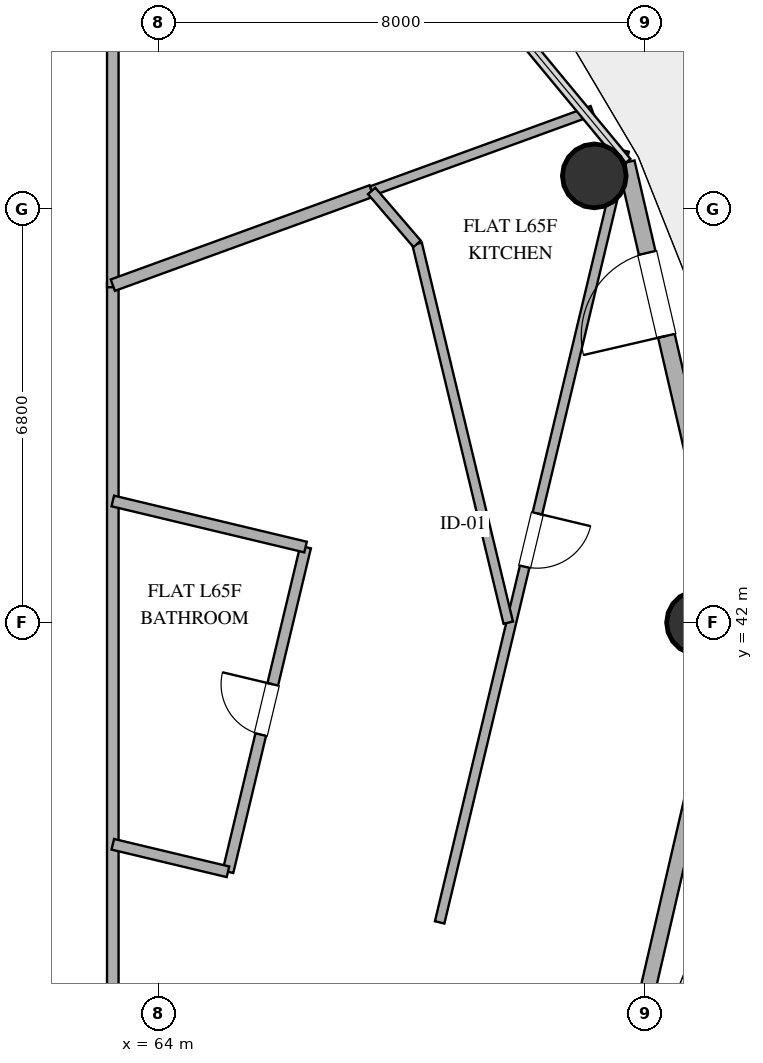
"""IFC4 building model, lengths in metres.
Left out: names, types, materials, properties, quantities, classifications, styles, units other than length and angle.
Written with IfcOpenShell. Run it as: python <this file> out.ifc"""

import sys

from ifc_helpers import new_model, si_unit, direction, frame, frame_2d, origin, origin_2d, place, context, subcontext, project, spatial, rectangle, hollow_circle, extrude, element, fill, save


model = new_model("IFC4")
c1 = context("Model", 3, precision=1e-05, world=origin(), true_north=direction((0.0, 1.0)))
c2 = subcontext(c1, "Body", "Model", "MODEL_VIEW")
j1 = project(units=[si_unit("LENGTHUNIT", "METRE"), si_unit("PLANEANGLEUNIT", "RADIAN")], contexts=[c1])
p1 = place(None, origin())
s1 = spatial("IfcSite", under=j1, at=p1, CompositionType="ELEMENT")
p2 = place(p1, origin())
s2 = spatial("IfcBuilding", under=s1, at=p2, CompositionType="ELEMENT")
p3 = place(p2, frame((0.0, 0.0, 253.2)))
s3 = spatial("IfcBuildingStorey", under=s2, at=p3, CompositionType="ELEMENT", Elevation=253.2)
for number, where, z_axis, x_axis in (
    (1, (72.883, 42.0, 0.0), (0.0, 0.0, 1.0), (1.0, 0.0, 0.0)),
    (2, (71.169, 49.347, 0.0), (0.0, 0.0, 1.0), (1.0, 0.0, 0.0)),
):
    element("IfcColumn", number, at=place(p3, frame(where, z_axis=z_axis, x_axis=x_axis)), inside=s3, PredefinedType="COLUMN", context=c2, shape_type="SweptSolid", body=[
        extrude(hollow_circle(Radius=0.525, WallThickness=0.028, at=origin_2d()), origin(), (0.0, 0.0, 1.0), 3.25),
    ])
p4 = place(p3, frame((73.447, 42.0, 0.0), z_axis=(0.0, 0.0, 1.0), x_axis=(-0.225635078214, 0.974211892495, 0.0)))
e3 = element("IfcWall", 3, at=p4, inside=s3, PredefinedType="SOLIDWALL", context=c2, shape_type="SweptSolid", body=[
    extrude(rectangle(XDim=7.77, YDim=0.28, at=frame_2d((3.885, 0.0))), origin(), (0.0, 0.0, 1.0), 3.25),
])
p5 = place(p4, frame((4.842, 0.0, 0.0)))
e4 = element("IfcOpeningElement", 4, at=p5, cuts=e3, PredefinedType="OPENING", context=c2, shape_type="SweptSolid", body=[
    extrude(rectangle(XDim=1.4, YDim=2.2, at=frame_2d((0.7, 1.1))), frame((0.0, 0.15, 0.0), z_axis=(0.0, -1.0, 0.0), x_axis=(1.0, 0.0, 0.0)), (0.0, 0.0, 1.0), 0.3),
])
p6 = place(p3, frame((71.694, 34.43, 0.0), z_axis=(0.0, 0.0, 1.0), x_axis=(0.225635078214, 0.974211892495, 0.0)))
e5 = element("IfcWall", 5, at=p6, inside=s3, PredefinedType="SOLIDWALL", context=c2, shape_type="SweptSolid", body=[
    extrude(rectangle(XDim=7.77, YDim=0.25, at=frame_2d((3.885, 0.0))), origin(), (0.0, 0.0, 1.0), 3.25),
])
p7 = place(p3, frame((71.658, 49.763, 0.0), z_axis=(0.0, 0.0, 1.0), x_axis=(-0.23242816807, -0.972613564931, 0.0)))
e6 = element("IfcWall", 6, at=p7, inside=s3, PredefinedType="PLUMBINGWALL", context=c2, shape_type="SweptSolid", body=[
    extrude(rectangle(XDim=13.049, YDim=0.16, at=frame_2d((6.524, 0.0))), origin(), (0.0, 0.0, 1.0), 2.61),
])
p8 = place(p7, frame((6.135, 0.0, 0.0)))
e7 = element("IfcOpeningElement", 7, at=p8, cuts=e6, PredefinedType="OPENING", context=c2, shape_type="SweptSolid", body=[
    extrude(rectangle(XDim=0.9, YDim=2.1, at=frame_2d((0.45, 1.05))), frame((0.0, 0.09, 0.0), z_axis=(0.0, -1.0, 0.0), x_axis=(1.0, 0.0, 0.0)), (0.0, 0.0, 1.0), 0.18),
])
p9 = place(p3, frame((63.25, 47.585, 0.0), z_axis=(0.0, 0.0, 1.0), x_axis=(0.0, -1.0, 0.0)))
e8 = element("IfcWall", 8, at=p9, inside=s3, PredefinedType="PARTITIONING", context=c2, shape_type="SweptSolid", body=[
    extrude(rectangle(XDim=16.635, YDim=0.19, at=frame_2d((8.317, 0.0))), origin(), (0.0, 0.0, 1.0), 2.61),
])
p10 = place(p3, frame((69.753, 42.0, 0.0), z_axis=(0.0, 0.0, 1.0), x_axis=(-0.233901777694, 0.972260231827, 0.0)))
e9 = element("IfcWall", 9, at=p10, inside=s3, PredefinedType="PLUMBINGWALL", context=c2, shape_type="SweptSolid", body=[
    extrude(rectangle(XDim=6.408, YDim=0.16, at=frame_2d((3.204, 0.0))), origin(), (0.0, 0.0, 1.0), 2.61),
])
p11 = place(p3, frame((63.25, 53.05, 0.0), z_axis=(0.0, 0.0, 1.0), x_axis=(0.0, -1.0, 0.0)))
e10 = element("IfcWall", 10, at=p11, inside=s3, PredefinedType="PARTITIONING", context=c2, shape_type="SweptSolid", body=[
    extrude(rectangle(XDim=5.534, YDim=0.19, at=frame_2d((2.767, 0.0))), origin(), (0.0, 0.0, 1.0), 2.61),
])
p12 = place(p3, frame((65.144, 37.903, 0.0), z_axis=(0.0, 0.0, 1.0), x_axis=(0.232447954132, 0.972608836388, 0.0)))
e11 = element("IfcWall", 11, at=p12, inside=s3, PredefinedType="PLUMBINGWALL", context=c2, shape_type="SweptSolid", body=[
    extrude(rectangle(XDim=5.491, YDim=0.18, at=frame_2d((2.746, 0.0))), origin(), (0.0, 0.0, 1.0), 2.61),
])
p13 = place(p12, frame((2.32, 0.0, 0.0)))
e12 = element("IfcOpeningElement", 12, at=p13, cuts=e11, PredefinedType="OPENING", context=c2, shape_type="SweptSolid", body=[
    extrude(rectangle(XDim=0.85, YDim=2.1, at=frame_2d((0.425, 1.05))), frame((0.0, 0.1, 0.0), z_axis=(0.0, -1.0, 0.0), x_axis=(1.0, 0.0, 0.0)), (0.0, 0.0, 1.0), 0.2),
])
p14 = place(p3, frame((63.25, 47.551, 0.0), z_axis=(0.0, 0.0, 1.0), x_axis=(0.939695825247, 0.342011339012, 0.0)))
e13 = element("IfcWall", 13, at=p14, inside=s3, PredefinedType="PARTITIONING", context=c2, shape_type="SweptSolid", body=[
    extrude(rectangle(XDim=4.53, YDim=0.2, at=frame_2d((2.265, 0.0))), origin(), (0.0, 0.0, 1.0), 2.61),
])
p15 = place(p3, frame((67.507, 49.1, 0.0), z_axis=(0.0, 0.0, 1.0), x_axis=(0.939701103556, 0.341996836208, 0.0)))
e14 = element("IfcWall", 14, at=p15, inside=s3, PredefinedType="PLUMBINGWALL", context=c2, shape_type="SweptSolid", body=[
    extrude(rectangle(XDim=3.862, YDim=0.16, at=frame_2d((1.931, 0.0))), origin(), (0.0, 0.0, 1.0), 2.61),
])
p16 = place(p3, frame((66.42, 43.244, 0.0), z_axis=(0.0, 0.0, 1.0), x_axis=(-0.972614607238, 0.232423806412, 0.0)))
e15 = element("IfcWall", 15, at=p16, inside=s3, PredefinedType="PLUMBINGWALL", context=c2, shape_type="SweptSolid", body=[
    extrude(rectangle(XDim=3.26, YDim=0.18, at=frame_2d((1.63, 0.0))), origin(), (0.0, 0.0, 1.0), 2.61),
])
p17 = place(p3, frame((63.25, 38.356, 0.0), z_axis=(0.0, 0.0, 1.0), x_axis=(0.972605397064, -0.232462344483, 0.0)))
e16 = element("IfcWall", 16, at=p17, inside=s3, PredefinedType="PLUMBINGWALL", context=c2, shape_type="SweptSolid", body=[
    extrude(rectangle(XDim=1.947, YDim=0.18, at=frame_2d((0.974, 0.0))), origin(), (0.0, 0.0, 1.0), 2.61),
])
p18 = place(p3, frame((68.255, 48.23, 0.0), z_axis=(0.0, 0.0, 1.0), x_axis=(-0.651894891584, 0.758309336832, 0.0)))
e17 = element("IfcWall", 17, at=p18, inside=s3, PredefinedType="PLUMBINGWALL", context=c2, shape_type="SweptSolid", body=[
    extrude(rectangle(XDim=1.147, YDim=0.16, at=frame_2d((0.574, 0.0))), origin(), (0.0, 0.0, 1.0), 2.61),
])
p19 = place(p5, origin())
e18 = element("IfcDoor", 18, at=p19, inside=s3, OperationType="SINGLE_SWING_LEFT", PredefinedType="DOOR", context=c2, shape_type="SweptSolid", body=[
    extrude(rectangle(XDim=1.4, YDim=2.2, at=frame_2d((0.7, 1.1))), frame((0.0, 0.025, 0.0), z_axis=(0.0, -1.0, 0.0), x_axis=(1.0, 0.0, 0.0)), (0.0, 0.0, 1.0), 0.05),
])
fill(e4, e18)
p20 = place(p8, origin())
e19 = element("IfcDoor", 19, at=p20, inside=s3, OperationType="SINGLE_SWING_LEFT", PredefinedType="DOOR", context=c2, shape_type="SweptSolid", body=[
    extrude(rectangle(XDim=0.9, YDim=2.1, at=frame_2d((0.45, 1.05))), frame((0.0, 0.025, 0.0), z_axis=(0.0, -1.0, 0.0), x_axis=(1.0, 0.0, 0.0)), (0.0, 0.0, 1.0), 0.05),
])
fill(e7, e19)
p21 = place(p13, origin())
e20 = element("IfcDoor", 20, at=p21, inside=s3, OperationType="SINGLE_SWING_RIGHT", PredefinedType="DOOR", context=c2, shape_type="SweptSolid", body=[
    extrude(rectangle(XDim=0.85, YDim=2.1, at=frame_2d((0.425, 1.05))), frame((0.0, 0.025, 0.0), z_axis=(0.0, -1.0, 0.0), x_axis=(1.0, 0.0, 0.0)), (0.0, 0.0, 1.0), 0.05),
])
fill(e12, e20)
save(model, sys.argv[1])
